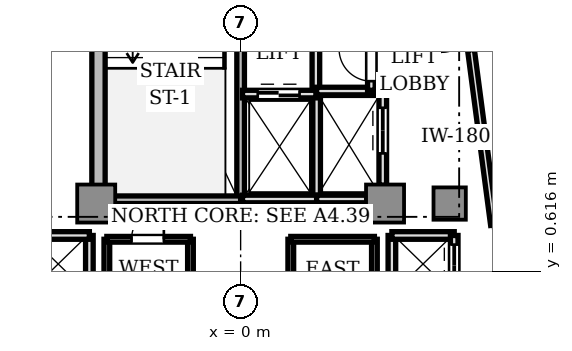
"""IFC4 building model, lengths in metres.
Left out: names, types, materials, properties, quantities, classifications, styles, units other than length and angle.
Written with IfcOpenShell. Run it as: python <this file> out.ifc"""

import sys

from ifc_helpers import new_model, si_unit, direction, frame, frame_2d, origin, origin_2d, place, context, subcontext, project, spatial, rectangle, extrude, source, transform, mapped, element, fill, save


model = new_model("IFC4")
c1 = context("Model", 3, precision=1e-05, world=origin(), true_north=direction((0.0, 1.0)))
c2 = subcontext(c1, "Body", "Model", "MODEL_VIEW")
j1 = project(units=[si_unit("LENGTHUNIT", "METRE"), si_unit("PLANEANGLEUNIT", "RADIAN")], contexts=[c1])
p1 = place(None, origin())
s1 = spatial("IfcSite", under=j1, at=p1, CompositionType="ELEMENT")
p2 = place(p1, origin())
s2 = spatial("IfcBuilding", under=s1, at=p2, CompositionType="ELEMENT")
p3 = place(p2, frame((0.0, 0.0, 209.85)))
s3 = spatial("IfcBuildingStorey", under=s2, at=p3, CompositionType="ELEMENT", Elevation=209.85)
p4 = place(p3, frame((-3.74, 2.85, 0.0), z_axis=(0.0, 0.0, 1.0), x_axis=(0.0, 1.0, 0.0)))
e1 = element("IfcWall", 1, at=p4, inside=s3, PredefinedType="SHEAR", context=c2, shape_type="SweptSolid", body=[
    extrude(rectangle(XDim=6.9, YDim=0.35, at=frame_2d((3.45, 0.0))), origin(), (0.0, 0.0, 1.0), 3.11),
])
m1 = source(origin(), c2, "Body", "SweptSolid", [
    extrude(rectangle(XDim=1.0, YDim=1.0, at=origin_2d()), origin(), (0.0, 0.0, 1.0), 3.11),
])
for number, where, z_axis, x_axis in (
    (2, (-3.8, 2.4, 0.0), (0.0, 0.0, 1.0), (1.0, 0.0, 0.0)),
    (3, (3.8, 2.4, 0.0), (0.0, 0.0, 1.0), (1.0, 0.0, 0.0)),
):
    element("IfcColumn", number, at=place(p3, frame(where, z_axis=z_axis, x_axis=x_axis)), inside=s3, PredefinedType="COLUMN", context=c2, shape_type="MappedRepresentation", body=[
        mapped(m1, transform((0.0, 0.0, 0.0), scale=1.0)),
    ])
m2 = source(origin(), c2, "Body", "SweptSolid", [
    extrude(rectangle(XDim=0.85, YDim=0.85, at=origin_2d()), origin(), (0.0, 0.0, 1.0), 3.11),
])
p5 = place(p3, frame((5.5, 2.4, 0.0), z_axis=(0.0, 0.0, 1.0), x_axis=(1.0, 0.0, 0.0)))
e4 = element("IfcColumn", 4, at=p5, inside=s3, PredefinedType="COLUMN", context=c2, shape_type="MappedRepresentation", body=[
    mapped(m2, transform((0.0, 0.0, 0.0), scale=1.0)),
])
p6 = place(p3, frame((4.864, 6.339, 0.0), z_axis=(0.0, 0.0, 1.0), x_axis=(-0.130564442062, 0.991439824936, 0.0)))
e5 = element("IfcWall", 5, at=p6, inside=s3, PredefinedType="STANDARD", context=c2, shape_type="SweptSolid", body=[
    extrude(rectangle(XDim=2.7, YDim=0.22, at=frame_2d((1.35, 0.0))), origin(), (0.0, 0.0, 1.0), 3.11),
])
p7 = place(p6, frame((1.4, 0.0, 0.0)))
e6 = element("IfcOpeningElement", 6, at=p7, cuts=e5, PredefinedType="OPENING", context=c2, shape_type="SweptSolid", body=[
    extrude(rectangle(XDim=1.0, YDim=2.2, at=frame_2d((0.5, 1.1))), frame((0.0, 0.12, 0.0), z_axis=(0.0, -1.0, 0.0), x_axis=(1.0, 0.0, 0.0)), (0.0, 0.0, 1.0), 0.24),
])
p8 = place(p3, frame((0.0, 2.5, 0.0), z_axis=(0.0, 0.0, 1.0), x_axis=(0.0, 1.0, 0.0)))
e7 = element("IfcWall", 7, at=p8, inside=s3, PredefinedType="SOLIDWALL", context=c2, shape_type="SweptSolid", body=[
    extrude(rectangle(XDim=7.68, YDim=0.2, at=frame_2d((3.84, 0.0))), origin(), (0.0, 0.0, 1.0), 3.11),
])
p9 = place(p8, frame((6.36, 0.0, 0.0)))
e8 = element("IfcOpeningElement", 8, at=p9, cuts=e7, PredefinedType="OPENING", context=c2, shape_type="SweptSolid", body=[
    extrude(rectangle(XDim=1.1, YDim=2.15, at=frame_2d((0.55, 1.075))), frame((0.0, 0.11, 0.0), z_axis=(0.0, -1.0, 0.0), x_axis=(1.0, 0.0, 0.0)), (0.0, 0.0, 1.0), 0.22),
])
p10 = place(p3, frame((-3.72, 2.5, 0.0), z_axis=(0.0, 0.0, 1.0), x_axis=(1.0, 0.0, 0.0)))
e9 = element("IfcWall", 9, at=p10, inside=s3, PredefinedType="SOLIDWALL", context=c2, shape_type="SweptSolid", body=[
    extrude(rectangle(XDim=3.72, YDim=0.2, at=frame_2d((1.86, 0.0))), origin(), (0.0, 0.0, 1.0), 3.11),
])
p11 = place(p3, frame((1.98, 5.32, 0.0), z_axis=(0.0, 0.0, 1.0), x_axis=(0.0, 1.0, 0.0)))
e10 = element("IfcWall", 10, at=p11, inside=s3, PredefinedType="SOLIDWALL", context=c2, shape_type="SweptSolid", body=[
    extrude(rectangle(XDim=4.66, YDim=0.2, at=frame_2d((2.33, 0.0))), origin(), (0.0, 0.0, 1.0), 2.66),
])
p12 = place(p11, frame((3.04, 0.0, 0.0)))
e11 = element("IfcOpeningElement", 11, at=p12, cuts=e10, PredefinedType="OPENING", context=c2, shape_type="SweptSolid", body=[
    extrude(rectangle(XDim=0.85, YDim=2.1, at=frame_2d((0.425, 1.05))), frame((0.0, 0.11, 0.0), z_axis=(0.0, -1.0, 0.0), x_axis=(1.0, 0.0, 0.0)), (0.0, 0.0, 1.0), 0.22),
])
p13 = place(p3, frame((2.0, 2.5, 0.0), z_axis=(0.0, 0.0, 1.0), x_axis=(0.0, 1.0, 0.0)))
e12 = element("IfcWall", 12, at=p13, inside=s3, PredefinedType="SOLIDWALL", context=c2, shape_type="SweptSolid", body=[
    extrude(rectangle(XDim=2.78, YDim=0.2, at=frame_2d((1.39, 0.0))), origin(), (0.0, 0.0, 1.0), 2.66),
])
p14 = place(p3, frame((0.05, 2.52, 0.0), z_axis=(0.0, 0.0, 1.0), x_axis=(1.0, 0.0, 0.0)))
e13 = element("IfcWall", 13, at=p14, inside=s3, PredefinedType="SOLIDWALL", context=c2, shape_type="SweptSolid", body=[
    extrude(rectangle(XDim=1.95, YDim=0.2, at=frame_2d((0.975, 0.0))), origin(), (0.0, 0.0, 1.0), 2.66),
])
p15 = place(p3, frame((0.05, 5.28, 0.0), z_axis=(0.0, 0.0, 1.0), x_axis=(1.0, 0.0, 0.0)))
e14 = element("IfcWall", 14, at=p15, inside=s3, PredefinedType="SOLIDWALL", context=c2, shape_type="SweptSolid", body=[
    extrude(rectangle(XDim=1.93, YDim=0.2, at=frame_2d((0.965, 0.0))), origin(), (0.0, 0.0, 1.0), 2.66),
])
p16 = place(p15, frame((0.4, 0.0, 0.0)))
e15 = element("IfcOpeningElement", 15, at=p16, cuts=e14, PredefinedType="OPENING", context=c2, shape_type="SweptSolid", body=[
    extrude(rectangle(XDim=1.1, YDim=2.2, at=frame_2d((0.55, 1.1))), frame((0.0, 0.11, 0.0), z_axis=(0.0, -1.0, 0.0), x_axis=(1.0, 0.0, 0.0)), (0.0, 0.0, 1.0), 0.22),
])
p17 = place(p3, frame((2.0, 2.52, 0.0), z_axis=(0.0, 0.0, 1.0), x_axis=(1.0, 0.0, 0.0)))
e16 = element("IfcWall", 16, at=p17, inside=s3, PredefinedType="SOLIDWALL", context=c2, shape_type="SweptSolid", body=[
    extrude(rectangle(XDim=1.32, YDim=0.2, at=frame_2d((0.66, 0.0))), origin(), (0.0, 0.0, 1.0), 2.66),
])
p18 = place(p3, frame((2.0, 5.36, 0.0), z_axis=(0.0, 0.0, 1.0), x_axis=(1.0, 0.0, 0.0)))
e17 = element("IfcWall", 17, at=p18, inside=s3, PredefinedType="SOLIDWALL", context=c2, shape_type="SweptSolid", body=[
    extrude(rectangle(XDim=1.74, YDim=0.2, at=frame_2d((0.87, 0.0))), origin(), (0.0, 0.0, 1.0), 2.66),
])
p19 = place(p3, frame((3.74, 2.88, 0.0), z_axis=(0.0, 0.0, 1.0), x_axis=(0.0, 1.0, 0.0)))
e18 = element("IfcWall", 18, at=p19, inside=s3, PredefinedType="SOLIDWALL", context=c2, shape_type="SweptSolid", body=[
    extrude(rectangle(XDim=2.48, YDim=0.2, at=frame_2d((1.24, 0.0))), origin(), (0.0, 0.0, 1.0), 2.66),
])
p20 = place(p19, frame((0.84, 0.0, 0.0)))
e19 = element("IfcOpeningElement", 19, at=p20, cuts=e18, PredefinedType="OPENING", context=c2, shape_type="SweptSolid", body=[
    extrude(rectangle(XDim=1.2, YDim=2.2, at=frame_2d((0.6, 1.1))), frame((0.0, 0.11, 0.0), z_axis=(0.0, -1.0, 0.0), x_axis=(1.0, 0.0, 0.0)), (0.0, 0.0, 1.0), 0.22),
])
p21 = place(p3, frame((3.98, -1.56, 0.0), z_axis=(0.0, 0.0, 1.0), x_axis=(0.0, 1.0, 0.0)))
e20 = element("IfcWall", 20, at=p21, inside=s3, PredefinedType="SOLIDWALL", context=c2, shape_type="SweptSolid", body=[
    extrude(rectangle(XDim=3.12, YDim=0.2, at=frame_2d((1.56, 0.0))), origin(), (0.0, 0.0, 1.0), 2.33),
])
p22 = place(p3, frame((3.98, 1.56, 0.0), z_axis=(0.0, 0.0, 1.0), x_axis=(1.0, 0.0, 0.0)))
e21 = element("IfcWall", 21, at=p22, inside=s3, PredefinedType="SOLIDWALL", context=c2, shape_type="SweptSolid", body=[
    extrude(rectangle(XDim=1.64, YDim=0.2, at=frame_2d((0.82, 0.0))), origin(), (0.0, 0.0, 1.0), 2.66),
])
p23 = place(p3, frame((5.62, 0.0, 0.0), z_axis=(0.0, 0.0, 1.0), x_axis=(0.0, 1.0, 0.0)))
e22 = element("IfcWall", 22, at=p23, inside=s3, PredefinedType="SOLIDWALL", context=c2, shape_type="SweptSolid", body=[
    extrude(rectangle(XDim=1.56, YDim=0.2, at=frame_2d((0.78, 0.0))), origin(), (0.0, 0.0, 1.0), 2.66),
])
p24 = place(p23, frame((0.22, 0.0, 0.0)))
e23 = element("IfcOpeningElement", 23, at=p24, cuts=e22, PredefinedType="OPENING", context=c2, shape_type="SweptSolid", body=[
    extrude(rectangle(XDim=1.1, YDim=2.2, at=frame_2d((0.55, 1.1))), frame((0.0, 0.11, 0.0), z_axis=(0.0, -1.0, 0.0), x_axis=(1.0, 0.0, 0.0)), (0.0, 0.0, 1.0), 0.22),
])
p25 = place(p3, frame((-3.98, -1.56, 0.0), z_axis=(0.0, 0.0, 1.0), x_axis=(0.0, 1.0, 0.0)))
e24 = element("IfcWall", 24, at=p25, inside=s3, PredefinedType="SOLIDWALL", context=c2, shape_type="SweptSolid", body=[
    extrude(rectangle(XDim=3.12, YDim=0.2, at=frame_2d((1.56, 0.0))), origin(), (0.0, 0.0, 1.0), 2.33),
])
p26 = place(p3, frame((-5.62, 1.56, 0.0), z_axis=(0.0, 0.0, 1.0), x_axis=(1.0, 0.0, 0.0)))
e25 = element("IfcWall", 25, at=p26, inside=s3, PredefinedType="SOLIDWALL", context=c2, shape_type="SweptSolid", body=[
    extrude(rectangle(XDim=1.64, YDim=0.2, at=frame_2d((0.82, 0.0))), origin(), (0.0, 0.0, 1.0), 2.66),
])
p27 = place(p3, frame((3.44, 5.38, 0.0), z_axis=(0.0, 0.0, 1.0), x_axis=(0.0, 1.0, 0.0)))
e26 = element("IfcWall", 26, at=p27, inside=s3, PredefinedType="SOLIDWALL", context=c2, shape_type="SweptSolid", body=[
    extrude(rectangle(XDim=2.77, YDim=0.2, at=frame_2d((1.385, 0.0))), origin(), (0.0, 0.0, 1.0), 2.66),
])
p28 = place(p27, frame((0.24, 0.0, 0.0)))
e27 = element("IfcOpeningElement", 27, at=p28, cuts=e26, PredefinedType="OPENING", context=c2, shape_type="SweptSolid", body=[
    extrude(rectangle(XDim=0.85, YDim=2.1, at=frame_2d((0.425, 1.05))), frame((0.0, 0.11, 0.0), z_axis=(0.0, -1.0, 0.0), x_axis=(1.0, 0.0, 0.0)), (0.0, 0.0, 1.0), 0.22),
])
p29 = place(p27, frame((1.62, 0.0, 0.0)))
e28 = element("IfcOpeningElement", 28, at=p29, cuts=e26, PredefinedType="OPENING", context=c2, shape_type="SweptSolid", body=[
    extrude(rectangle(XDim=0.85, YDim=2.1, at=frame_2d((0.425, 1.05))), frame((0.0, 0.11, 0.0), z_axis=(0.0, -1.0, 0.0), x_axis=(1.0, 0.0, 0.0)), (0.0, 0.0, 1.0), 0.22),
])
p30 = place(p3, frame((-1.32, -1.46, 0.0), z_axis=(0.0, 0.0, 1.0), x_axis=(0.0, 1.0, 0.0)))
e29 = element("IfcWall", 29, at=p30, inside=s3, PredefinedType="PARTITIONING", context=c2, shape_type="SweptSolid", body=[
    extrude(rectangle(XDim=2.92, YDim=0.15, at=frame_2d((1.46, 0.0))), origin(), (0.0, 0.0, 1.0), 2.66),
])
p31 = place(p3, frame((-3.52, -1.46, 0.0), z_axis=(0.0, 0.0, 1.0), x_axis=(0.0, 1.0, 0.0)))
e30 = element("IfcWall", 30, at=p31, inside=s3, PredefinedType="PARTITIONING", context=c2, shape_type="SweptSolid", body=[
    extrude(rectangle(XDim=2.92, YDim=0.15, at=frame_2d((1.46, 0.0))), origin(), (0.0, 0.0, 1.0), 2.33),
])
p32 = place(p3, frame((-3.52, 1.46, 0.0), z_axis=(0.0, 0.0, 1.0), x_axis=(1.0, 0.0, 0.0)))
e31 = element("IfcWall", 31, at=p32, inside=s3, PredefinedType="PARTITIONING", context=c2, shape_type="SweptSolid", body=[
    extrude(rectangle(XDim=2.2, YDim=0.15, at=frame_2d((1.1, 0.0))), origin(), (0.0, 0.0, 1.0), 2.66),
])
p33 = place(p32, frame((0.65, 0.0, 0.0)))
e32 = element("IfcOpeningElement", 32, at=p33, cuts=e31, PredefinedType="OPENING", context=c2, shape_type="SweptSolid", body=[
    extrude(rectangle(XDim=0.85, YDim=2.1, at=frame_2d((0.425, 1.05))), frame((0.0, 0.085, 0.0), z_axis=(0.0, -1.0, 0.0), x_axis=(1.0, 0.0, 0.0)), (0.0, 0.0, 1.0), 0.17),
])
p34 = place(p3, frame((1.32, -1.46, 0.0), z_axis=(0.0, 0.0, 1.0), x_axis=(0.0, 1.0, 0.0)))
e33 = element("IfcWall", 33, at=p34, inside=s3, PredefinedType="PARTITIONING", context=c2, shape_type="SweptSolid", body=[
    extrude(rectangle(XDim=2.92, YDim=0.15, at=frame_2d((1.46, 0.0))), origin(), (0.0, 0.0, 1.0), 2.66),
])
p35 = place(p3, frame((3.52, -1.46, 0.0), z_axis=(0.0, 0.0, 1.0), x_axis=(0.0, 1.0, 0.0)))
e34 = element("IfcWall", 34, at=p35, inside=s3, PredefinedType="PARTITIONING", context=c2, shape_type="SweptSolid", body=[
    extrude(rectangle(XDim=2.92, YDim=0.15, at=frame_2d((1.46, 0.0))), origin(), (0.0, 0.0, 1.0), 2.33),
])
p36 = place(p3, frame((1.32, 1.46, 0.0), z_axis=(0.0, 0.0, 1.0), x_axis=(1.0, 0.0, 0.0)))
e35 = element("IfcWall", 35, at=p36, inside=s3, PredefinedType="PARTITIONING", context=c2, shape_type="SweptSolid", body=[
    extrude(rectangle(XDim=2.2, YDim=0.15, at=frame_2d((1.1, 0.0))), origin(), (0.0, 0.0, 1.0), 2.66),
])
p37 = place(p3, frame((6.667, 1.836, 0.0), z_axis=(0.0, 0.0, 1.0), x_axis=(-0.13051970184, 0.991445715827, 0.0)))
e36 = element("IfcWall", 36, at=p37, inside=s3, PredefinedType="PARTITIONING", context=c2, shape_type="SweptSolid", body=[
    extrude(rectangle(XDim=4.65, YDim=0.18, at=frame_2d((2.325, 0.0))), origin(), (0.0, 0.0, 1.0), 2.66),
])
m3 = source(origin(), c2, "Body", "SweptSolid", [
    extrude(rectangle(XDim=1.1, YDim=0.05, at=origin_2d()), origin(), (0.0, 0.0, 1.0), 2.2),
])
p38 = place(p16, frame((0.55, 0.0, 0.0)))
e37 = element("IfcDoor", 37, at=p38, inside=s3, OperationType="DOUBLE_DOOR_SLIDING", PredefinedType="DOOR", context=c2, shape_type="MappedRepresentation", body=[
    mapped(m3, transform((0.0, 0.0, 0.0), scale=1.0)),
])
fill(e15, e37)
m4 = source(origin(), c2, "Body", "SweptSolid", [
    extrude(rectangle(XDim=1.2, YDim=0.05, at=origin_2d()), origin(), (0.0, 0.0, 1.0), 2.2),
])
p39 = place(p20, frame((0.6, 0.0, 0.0)))
e38 = element("IfcDoor", 38, at=p39, inside=s3, OperationType="DOUBLE_DOOR_SLIDING", PredefinedType="DOOR", context=c2, shape_type="MappedRepresentation", body=[
    mapped(m4, transform((0.0, 0.0, 0.0), scale=1.0)),
])
fill(e19, e38)
p40 = place(p24, frame((0.55, 0.0, 0.0)))
e39 = element("IfcDoor", 39, at=p40, inside=s3, OperationType="DOUBLE_DOOR_SLIDING", PredefinedType="DOOR", context=c2, shape_type="MappedRepresentation", body=[
    mapped(m3, transform((0.0, 0.0, 0.0), scale=1.0)),
])
fill(e23, e39)
m5 = source(origin(), c2, "Body", "SweptSolid", [
    extrude(rectangle(XDim=0.85, YDim=0.05, at=origin_2d()), origin(), (0.0, 0.0, 1.0), 2.1),
])
p41 = place(p28, frame((0.425, 0.0, 0.0)))
e40 = element("IfcDoor", 40, at=p41, inside=s3, OperationType="SINGLE_SWING_RIGHT", PredefinedType="DOOR", context=c2, shape_type="MappedRepresentation", body=[
    mapped(m5, transform((0.0, 0.0, 0.0), scale=1.0)),
])
fill(e27, e40)
p42 = place(p33, frame((0.425, 0.0, 0.0)))
e41 = element("IfcDoor", 41, at=p42, inside=s3, OperationType="SINGLE_SWING_RIGHT", PredefinedType="DOOR", context=c2, shape_type="MappedRepresentation", body=[
    mapped(m5, transform((0.0, 0.0, 0.0), scale=1.0)),
])
fill(e32, e41)
save(model, sys.argv[1])
